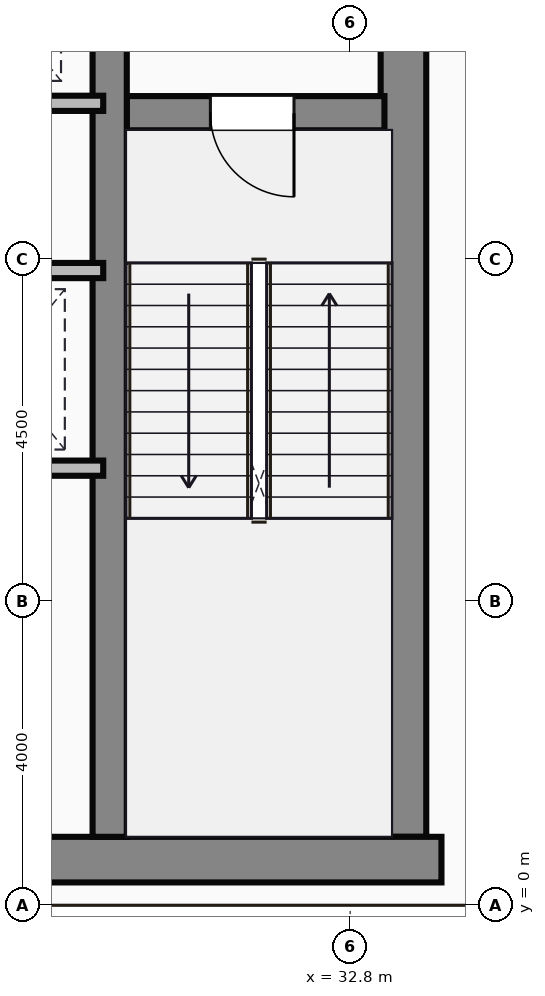
"""IFC4 building model, lengths in metres.
Left out: names, types, materials, properties, quantities, classifications, styles, units other than length and angle.
Written with IfcOpenShell. Run it as: python <this file> out.ifc"""

import sys

from ifc_helpers import new_model, si_unit, direction, frame, frame_2d, origin, place, context, subcontext, project, spatial, rectangle, extrude, source, transform, mapped, element, fill, save


model = new_model("IFC4")
c1 = context("Model", 3, precision=1e-05, world=origin(), true_north=direction((0.0, 1.0)))
c2 = subcontext(c1, "Body", "Model", "MODEL_VIEW")
j1 = project(units=[si_unit("LENGTHUNIT", "METRE"), si_unit("PLANEANGLEUNIT", "RADIAN")], contexts=[c1])
p1 = place(None, origin())
s1 = spatial("IfcSite", under=j1, at=p1, CompositionType="ELEMENT")
p2 = place(p1, origin())
s2 = spatial("IfcBuilding", under=s1, at=p2, CompositionType="ELEMENT")
p3 = place(p2, frame((0.0, 0.0, 236.05)))
s3 = spatial("IfcBuildingStorey", under=s2, at=p3, CompositionType="ELEMENT", Elevation=236.05)
m1 = source(origin(), c2, "Body", "SweptSolid", [
    extrude(rectangle(XDim=29.5, YDim=0.6, at=frame_2d((14.75, 0.0))), origin(), (0.0, 0.0, 1.0), 4.5),
])
p4 = place(p3, frame((4.5, 0.6, 0.0), z_axis=(0.0, 0.0, 1.0), x_axis=(1.0, 0.0, 0.0)))
e1 = element("IfcWall", 1, at=p4, inside=s3, PredefinedType="SHEAR", context=c2, shape_type="MappedRepresentation", body=[
    mapped(m1, transform((0.0, 0.0, 0.0))),
])
m2 = source(origin(), c2, "Body", "SweptSolid", [
    extrude(rectangle(XDim=13.1, YDim=0.6, at=frame_2d((6.55, 0.0))), origin(), (0.0, 0.0, 1.0), 4.5),
])
p5 = place(p3, frame((33.5, 0.9, 0.0), z_axis=(0.0, 0.0, 1.0), x_axis=(0.0, 1.0, 0.0)))
e2 = element("IfcWall", 2, at=p5, inside=s3, PredefinedType="SHEAR", context=c2, shape_type="MappedRepresentation", body=[
    mapped(m2, transform((0.0, 0.0, 0.0))),
])
m3 = source(origin(), c2, "Body", "SweptSolid", [
    extrude(rectangle(XDim=12.5, YDim=0.45, at=frame_2d((6.25, 0.0))), origin(), (0.0, 0.0, 1.0), 4.5),
])
p6 = place(p3, frame((29.635, 0.9, 0.0), z_axis=(0.0, 0.0, 1.0), x_axis=(0.0, 1.0, 0.0)))
e3 = element("IfcWall", 3, at=p6, inside=s3, PredefinedType="SHEAR", context=c2, shape_type="MappedRepresentation", body=[
    mapped(m3, transform((0.0, 0.0, 0.0))),
])
m4 = source(origin(), c2, "Body", "SweptSolid", [
    extrude(rectangle(XDim=3.39, YDim=0.45, at=frame_2d((1.695, 0.0))), origin(), (0.0, 0.0, 1.0), 4.5),
])
p7 = place(p3, frame((29.86, 10.42, 0.0), z_axis=(0.0, 0.0, 1.0), x_axis=(1.0, 0.0, 0.0)))
e4 = element("IfcWall", 4, at=p7, inside=s3, PredefinedType="SHEAR", context=c2, shape_type="MappedRepresentation", body=[
    mapped(m4, transform((0.0, 0.0, 0.0))),
])
p8 = place(p7, frame((1.1, 0.0, 0.0)))
e5 = element("IfcOpeningElement", 5, at=p8, cuts=e4, PredefinedType="OPENING", context=c2, shape_type="SweptSolid", body=[
    extrude(rectangle(XDim=1.1, YDim=2.15, at=frame_2d((0.55, 1.075))), frame((0.0, 0.235, 0.0), z_axis=(0.0, -1.0, 0.0), x_axis=(1.0, 0.0, 0.0)), (0.0, 0.0, 1.0), 0.47),
])
m5 = source(origin(), c2, "Body", "SweptSolid", [
    extrude(rectangle(XDim=8.8, YDim=0.2, at=frame_2d((4.4, 0.0))), origin(), (0.0, 0.0, 1.0), 4.25),
])
p9 = place(p3, frame((20.75, 10.55, 0.0), z_axis=(0.0, 0.0, 1.0), x_axis=(1.0, 0.0, 0.0)))
e6 = element("IfcWall", 6, at=p9, inside=s3, PredefinedType="PARTITIONING", context=c2, shape_type="MappedRepresentation", body=[
    mapped(m5, transform((0.0, 0.0, 0.0))),
])
m6 = source(origin(), c2, "Body", "SweptSolid", [
    extrude(rectangle(XDim=4.55, YDim=0.2, at=frame_2d((2.275, 0.0))), origin(), (0.0, 0.0, 1.0), 4.25),
])
for number, where, z_axis, x_axis in (
    (7, (25.0, 8.35, 0.0), (0.0, 0.0, 1.0), (1.0, 0.0, 0.0)),
    (8, (25.0, 5.75, 0.0), (0.0, 0.0, 1.0), (1.0, 0.0, 0.0)),
):
    element("IfcWall", number, at=place(p3, frame(where, z_axis=z_axis, x_axis=x_axis)), inside=s3, PredefinedType="PARTITIONING", context=c2, shape_type="MappedRepresentation", body=[
        mapped(m6, transform((0.0, 0.0, 0.0))),
    ])
m7 = source(origin(), c2, "Body", "SweptSolid", [
    extrude(rectangle(XDim=1.1, YDim=2.15, at=frame_2d((0.55, 1.075))), frame((0.0, 0.025, 0.0), z_axis=(0.0, -1.0, 0.0), x_axis=(1.0, 0.0, 0.0)), (0.0, 0.0, 1.0), 0.05),
])
p10 = place(p8, frame((1.1, 0.0, 0.0), z_axis=(0.0, 0.0, 1.0), x_axis=(-1.0, 0.0, 0.0)))
e9 = element("IfcDoor", 9, at=p10, inside=s3, OperationType="SINGLE_SWING_RIGHT", PredefinedType="DOOR", context=c2, shape_type="MappedRepresentation", body=[
    mapped(m7, transform((0.0, 0.0, 0.0))),
])
fill(e5, e9)
save(model, sys.argv[1])
